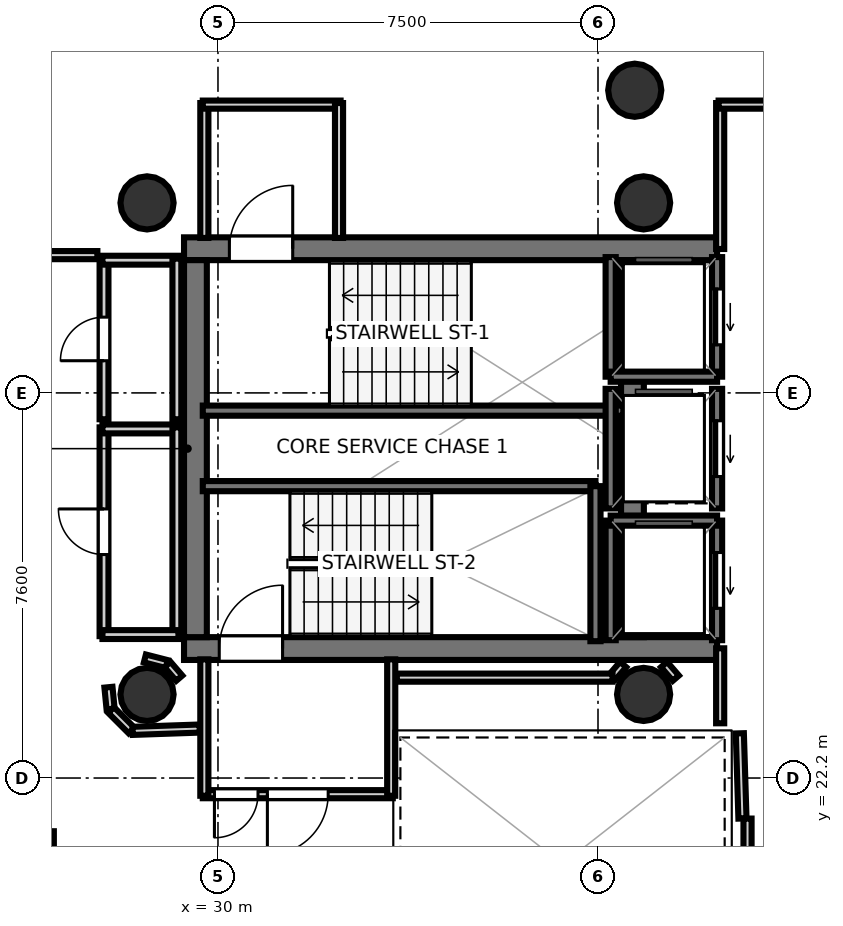
"""IFC4 building model, lengths in metres.
Left out: names, types, materials, properties, quantities, classifications, styles, units other than length and angle.
Written with IfcOpenShell. Run it as: python <this file> out.ifc"""

import sys

from ifc_helpers import new_model, si_unit, direction, frame, frame_2d, origin, origin_2d, place, context, subcontext, project, spatial, rectangle, hollow_circle, extrude, element, fill, save


model = new_model("IFC4")
c1 = context("Model", 3, precision=1e-05, world=origin(), true_north=direction((0.0, 1.0)))
c2 = subcontext(c1, "Body", "Model", "MODEL_VIEW")
j1 = project(units=[si_unit("LENGTHUNIT", "METRE"), si_unit("PLANEANGLEUNIT", "RADIAN")], contexts=[c1])
p1 = place(None, origin())
s1 = spatial("IfcSite", under=j1, at=p1, CompositionType="ELEMENT")
p2 = place(p1, origin())
s2 = spatial("IfcBuilding", under=s1, at=p2, CompositionType="ELEMENT")
p3 = place(p2, frame((0.0, 0.0, 242.7)))
s3 = spatial("IfcBuildingStorey", under=s2, at=p3, CompositionType="ELEMENT", Elevation=242.7)
p4 = place(p3, frame((29.33, 32.645, 0.0), z_axis=(0.0, 0.0, 1.0), x_axis=(1.0, 0.0, 0.0)))
e1 = element("IfcWall", 1, at=p4, inside=s3, PredefinedType="SHEAR", context=c2, shape_type="SweptSolid", body=[
    extrude(rectangle(XDim=10.52, YDim=0.45, at=frame_2d((5.26, 0.0))), origin(), (0.0, 0.0, 1.0), 3.52),
])
p5 = place(p4, frame((0.895, 0.0, 0.0)))
e2 = element("IfcOpeningElement", 2, at=p5, cuts=e1, PredefinedType="OPENING", context=c2, shape_type="SweptSolid", body=[
    extrude(rectangle(XDim=1.25, YDim=2.15, at=frame_2d((0.625, 1.075))), frame((0.0, 0.235, 0.0), z_axis=(0.0, -1.0, 0.0), x_axis=(1.0, 0.0, 0.0)), (0.0, 0.0, 1.0), 0.47),
])
p6 = place(p3, frame((29.33, 24.755, 0.0), z_axis=(0.0, 0.0, 1.0), x_axis=(1.0, 0.0, 0.0)))
e3 = element("IfcWall", 3, at=p6, inside=s3, PredefinedType="SHEAR", context=c2, shape_type="SweptSolid", body=[
    extrude(rectangle(XDim=10.52, YDim=0.45, at=frame_2d((5.26, 0.0))), origin(), (0.0, 0.0, 1.0), 3.52),
])
p7 = place(p6, frame((0.695, 0.0, 0.0)))
e4 = element("IfcOpeningElement", 4, at=p7, cuts=e3, PredefinedType="OPENING", context=c2, shape_type="SweptSolid", body=[
    extrude(rectangle(XDim=1.25, YDim=2.15, at=frame_2d((0.625, 1.075))), frame((0.0, 0.235, 0.0), z_axis=(0.0, -1.0, 0.0), x_axis=(1.0, 0.0, 0.0)), (0.0, 0.0, 1.0), 0.47),
])
for number, where, z_axis, x_axis in (
    (5, (29.555, 24.98, 0.0), (0.0, 0.0, 1.0), (0.0, 1.0, 0.0)),
    (6, (38.18, 24.98, 0.0), (0.0, 0.0, 1.0), (0.0, 1.0, 0.0)),
):
    element("IfcWall", number, at=place(p3, frame(where, z_axis=z_axis, x_axis=x_axis)), inside=s3, PredefinedType="SHEAR", context=c2, shape_type="SweptSolid", body=[
        extrude(rectangle(XDim=7.44, YDim=0.45, at=frame_2d((3.72, 0.0))), origin(), (0.0, 0.0, 1.0), 3.52),
    ])
for number, where, z_axis, x_axis in (
    (7, (28.6, 33.55, 0.0), (0.0, 0.0, 1.0), (1.0, 0.0, 0.0)),
    (8, (28.6, 23.85, 0.0), (0.0, 0.0, 1.0), (1.0, 0.0, 0.0)),
    (9, (38.4, 33.55, 0.0), (0.0, 0.0, 1.0), (1.0, 0.0, 0.0)),
    (10, (38.4, 23.85, 0.0), (0.0, 0.0, 1.0), (1.0, 0.0, 0.0)),
    (11, (38.225, 35.773, 0.0), (0.0, 0.0, 1.0), (1.0, 0.0, 0.0)),
):
    element("IfcColumn", number, at=place(p3, frame(where, z_axis=z_axis, x_axis=x_axis)), inside=s3, PredefinedType="COLUMN", context=c2, shape_type="SweptSolid", body=[
        extrude(hollow_circle(Radius=0.525, WallThickness=0.028, at=origin_2d()), origin(), (0.0, 0.0, 1.0), 3.7),
    ])
p8 = place(p3, frame((29.7, 29.45, 0.0), z_axis=(0.0, 0.0, 1.0), x_axis=(1.0, 0.0, 0.0)))
e12 = element("IfcWall", 12, at=p8, inside=s3, PredefinedType="SOLIDWALL", context=c2, shape_type="SweptSolid", body=[
    extrude(rectangle(XDim=8.3, YDim=0.2, at=frame_2d((4.15, 0.0))), origin(), (0.0, 0.0, 1.0), 3.52),
])
p9 = place(p3, frame((29.7, 27.96, 0.0), z_axis=(0.0, 0.0, 1.0), x_axis=(1.0, 0.0, 0.0)))
e13 = element("IfcWall", 13, at=p9, inside=s3, PredefinedType="SOLIDWALL", context=c2, shape_type="SweptSolid", body=[
    extrude(rectangle(XDim=7.75, YDim=0.2, at=frame_2d((3.875, 0.0))), origin(), (0.0, 0.0, 1.0), 3.52),
])
p10 = place(p3, frame((37.45, 24.9, 0.0), z_axis=(0.0, 0.0, 1.0), x_axis=(0.0, 1.0, 0.0)))
e14 = element("IfcWall", 14, at=p10, inside=s3, PredefinedType="SOLIDWALL", context=c2, shape_type="SweptSolid", body=[
    extrude(rectangle(XDim=3.06, YDim=0.2, at=frame_2d((1.53, 0.0))), origin(), (0.0, 0.0, 1.0), 3.52),
])
p11 = place(p3, frame((39.85, 30.12, 0.0), z_axis=(0.0, 0.0, 1.0), x_axis=(0.0, 1.0, 0.0)))
e15 = element("IfcWall", 15, at=p11, inside=s3, PredefinedType="SOLIDWALL", context=c2, shape_type="SweptSolid", body=[
    extrude(rectangle(XDim=2.36, YDim=0.2, at=frame_2d((1.18, 0.0))), origin(), (0.0, 0.0, 1.0), 3.52),
])
p12 = place(p11, frame((0.63, 0.0, 0.0)))
e16 = element("IfcOpeningElement", 16, at=p12, cuts=e15, PredefinedType="OPENING", context=c2, shape_type="SweptSolid", body=[
    extrude(rectangle(XDim=1.1, YDim=2.15, at=frame_2d((0.55, 1.075))), frame((0.0, 0.11, 0.0), z_axis=(0.0, -1.0, 0.0), x_axis=(1.0, 0.0, 0.0)), (0.0, 0.0, 1.0), 0.22),
])
p13 = place(p3, frame((37.75, 30.12, 0.0), z_axis=(0.0, 0.0, 1.0), x_axis=(0.0, 1.0, 0.0)))
e17 = element("IfcWall", 17, at=p13, inside=s3, PredefinedType="SOLIDWALL", context=c2, shape_type="SweptSolid", body=[
    extrude(rectangle(XDim=2.36, YDim=0.2, at=frame_2d((1.18, 0.0))), origin(), (0.0, 0.0, 1.0), 3.52),
])
p14 = place(p3, frame((37.75, 30.12, 0.0), z_axis=(0.0, 0.0, 1.0), x_axis=(1.0, 0.0, 0.0)))
e18 = element("IfcWall", 18, at=p14, inside=s3, PredefinedType="SOLIDWALL", context=c2, shape_type="SweptSolid", body=[
    extrude(rectangle(XDim=2.1, YDim=0.2, at=frame_2d((1.05, 0.0))), origin(), (0.0, 0.0, 1.0), 3.52),
])
p15 = place(p3, frame((39.85, 24.92, 0.0), z_axis=(0.0, 0.0, 1.0), x_axis=(0.0, 1.0, 0.0)))
e19 = element("IfcWall", 19, at=p15, inside=s3, PredefinedType="SOLIDWALL", context=c2, shape_type="SweptSolid", body=[
    extrude(rectangle(XDim=2.36, YDim=0.2, at=frame_2d((1.18, 0.0))), origin(), (0.0, 0.0, 1.0), 3.52),
])
p16 = place(p15, frame((0.63, 0.0, 0.0)))
e20 = element("IfcOpeningElement", 20, at=p16, cuts=e19, PredefinedType="OPENING", context=c2, shape_type="SweptSolid", body=[
    extrude(rectangle(XDim=1.1, YDim=2.15, at=frame_2d((0.55, 1.075))), frame((0.0, 0.11, 0.0), z_axis=(0.0, -1.0, 0.0), x_axis=(1.0, 0.0, 0.0)), (0.0, 0.0, 1.0), 0.22),
])
p17 = place(p3, frame((37.75, 24.92, 0.0), z_axis=(0.0, 0.0, 1.0), x_axis=(0.0, 1.0, 0.0)))
e21 = element("IfcWall", 21, at=p17, inside=s3, PredefinedType="SOLIDWALL", context=c2, shape_type="SweptSolid", body=[
    extrude(rectangle(XDim=2.36, YDim=0.2, at=frame_2d((1.18, 0.0))), origin(), (0.0, 0.0, 1.0), 3.52),
])
p18 = place(p3, frame((37.75, 27.28, 0.0), z_axis=(0.0, 0.0, 1.0), x_axis=(1.0, 0.0, 0.0)))
e22 = element("IfcWall", 22, at=p18, inside=s3, PredefinedType="SOLIDWALL", context=c2, shape_type="SweptSolid", body=[
    extrude(rectangle(XDim=2.1, YDim=0.2, at=frame_2d((1.05, 0.0))), origin(), (0.0, 0.0, 1.0), 3.52),
])
p19 = place(p3, frame((39.85, 27.52, 0.0), z_axis=(0.0, 0.0, 1.0), x_axis=(0.0, 1.0, 0.0)))
e23 = element("IfcWall", 23, at=p19, inside=s3, PredefinedType="SOLIDWALL", context=c2, shape_type="SweptSolid", body=[
    extrude(rectangle(XDim=2.36, YDim=0.2, at=frame_2d((1.18, 0.0))), origin(), (0.0, 0.0, 1.0), 3.52),
])
p20 = place(p19, frame((0.63, 0.0, 0.0)))
e24 = element("IfcOpeningElement", 24, at=p20, cuts=e23, PredefinedType="OPENING", context=c2, shape_type="SweptSolid", body=[
    extrude(rectangle(XDim=1.1, YDim=2.15, at=frame_2d((0.55, 1.075))), frame((0.0, 0.11, 0.0), z_axis=(0.0, -1.0, 0.0), x_axis=(1.0, 0.0, 0.0)), (0.0, 0.0, 1.0), 0.22),
])
p21 = place(p3, frame((37.75, 27.52, 0.0), z_axis=(0.0, 0.0, 1.0), x_axis=(0.0, 1.0, 0.0)))
e25 = element("IfcWall", 25, at=p21, inside=s3, PredefinedType="SOLIDWALL", context=c2, shape_type="SweptSolid", body=[
    extrude(rectangle(XDim=2.36, YDim=0.2, at=frame_2d((1.18, 0.0))), origin(), (0.0, 0.0, 1.0), 3.52),
])
p22 = place(p3, frame((29.731, 32.858, 0.0), z_axis=(0.0, 0.0, 1.0), x_axis=(0.0, 1.0, 0.0)))
e26 = element("IfcWall", 26, at=p22, inside=s3, PredefinedType="PARTITIONING", context=c2, shape_type="SweptSolid", body=[
    extrude(rectangle(XDim=2.662, YDim=0.16, at=frame_2d((1.331, 0.0))), origin(), (0.0, 0.0, 1.0), 2.84),
])
p23 = place(p3, frame((29.7, 35.489, 0.0), z_axis=(0.0, 0.0, 1.0), x_axis=(1.0, 0.0, 0.0)))
e27 = element("IfcWall", 27, at=p23, inside=s3, PredefinedType="PARTITIONING", context=c2, shape_type="SweptSolid", body=[
    extrude(rectangle(XDim=2.72, YDim=0.16, at=frame_2d((1.36, 0.0))), origin(), (0.0, 0.0, 1.0), 2.84),
])
p24 = place(p3, frame((32.389, 35.52, 0.0), z_axis=(0.0, 0.0, 1.0), x_axis=(0.0, -1.0, 0.0)))
e28 = element("IfcWall", 28, at=p24, inside=s3, PredefinedType="PARTITIONING", context=c2, shape_type="SweptSolid", body=[
    extrude(rectangle(XDim=2.662, YDim=0.16, at=frame_2d((1.331, 0.0))), origin(), (0.0, 0.0, 1.0), 2.84),
])
p25 = place(p3, frame((33.45, 21.881, 0.0), z_axis=(0.0, 0.0, 1.0), x_axis=(-1.0, 0.0, 0.0)))
e29 = element("IfcWall", 29, at=p25, inside=s3, PredefinedType="PARTITIONING", context=c2, shape_type="SweptSolid", body=[
    extrude(rectangle(XDim=3.75, YDim=0.16, at=frame_2d((1.875, 0.0))), origin(), (0.0, 0.0, 1.0), 2.84),
])
p26 = place(p25, frame((1.275, 0.0, 0.0)))
e30 = element("IfcOpeningElement", 30, at=p26, cuts=e29, PredefinedType="OPENING", context=c2, shape_type="SweptSolid", body=[
    extrude(rectangle(XDim=1.2, YDim=2.15, at=frame_2d((0.6, 1.075))), frame((0.0, 0.09, 0.0), z_axis=(0.0, -1.0, 0.0), x_axis=(1.0, 0.0, 0.0)), (0.0, 0.0, 1.0), 0.18),
])
p27 = place(p25, frame((2.66, 0.0, 0.0)))
e31 = element("IfcOpeningElement", 31, at=p27, cuts=e29, PredefinedType="OPENING", context=c2, shape_type="SweptSolid", body=[
    extrude(rectangle(XDim=0.86, YDim=2.05, at=frame_2d((0.43, 1.025))), frame((0.0, 0.09, 0.0), z_axis=(0.0, -1.0, 0.0), x_axis=(1.0, 0.0, 0.0)), (0.0, 0.0, 1.0), 0.18),
])
for number, where, z_axis, x_axis in (
    (32, (29.731, 21.85, 0.0), (0.0, 0.0, 1.0), (0.0, 1.0, 0.0)),
    (33, (33.419, 24.542, 0.0), (0.0, 0.0, 1.0), (0.0, -1.0, 0.0)),
):
    element("IfcWall", number, at=place(p3, frame(where, z_axis=z_axis, x_axis=x_axis)), inside=s3, PredefinedType="PARTITIONING", context=c2, shape_type="SweptSolid", body=[
        extrude(rectangle(XDim=2.692, YDim=0.16, at=frame_2d((1.346, 0.0))), origin(), (0.0, 0.0, 1.0), 2.84),
    ])
p28 = place(p3, frame((40.351, 21.401, 0.0), z_axis=(0.0, 0.0, 1.0), x_axis=(-0.031058045979, 0.999517582527, 0.0)))
e34 = element("IfcWall", 34, at=p28, inside=s3, PredefinedType="PARTITIONING", context=c2, shape_type="SweptSolid", body=[
    extrude(rectangle(XDim=1.682, YDim=0.16, at=frame_2d((0.841, 0.0))), origin(), (0.0, 0.0, 1.0), 2.84),
])
p29 = place(p3, frame((39.911, 23.28, 0.0), z_axis=(0.0, 0.0, 1.0), x_axis=(0.0, 1.0, 0.0)))
e35 = element("IfcWall", 35, at=p29, inside=s3, PredefinedType="PARTITIONING", context=c2, shape_type="SweptSolid", body=[
    extrude(rectangle(XDim=1.48, YDim=0.16, at=frame_2d((0.74, 0.0))), origin(), (0.0, 0.0, 1.0), 2.84),
])
p30 = place(p3, frame((39.911, 32.64, 0.0), z_axis=(0.0, 0.0, 1.0), x_axis=(0.0, 1.0, 0.0)))
e36 = element("IfcWall", 36, at=p30, inside=s3, PredefinedType="PARTITIONING", context=c2, shape_type="SweptSolid", body=[
    extrude(rectangle(XDim=2.88, YDim=0.16, at=frame_2d((1.44, 0.0))), origin(), (0.0, 0.0, 1.0), 2.84),
])
p31 = place(p3, frame((39.88, 35.489, 0.0), z_axis=(0.0, 0.0, 1.0), x_axis=(1.0, 0.0, 0.0)))
e37 = element("IfcWall", 37, at=p31, inside=s3, PredefinedType="PARTITIONING", context=c2, shape_type="SweptSolid", body=[
    extrude(rectangle(XDim=1.48, YDim=0.16, at=frame_2d((0.74, 0.0))), origin(), (0.0, 0.0, 1.0), 2.84),
])
p32 = place(p3, frame((40.451, 18.08, 0.0), z_axis=(0.0, 0.0, 1.0), x_axis=(0.0, 1.0, 0.0)))
e38 = element("IfcWall", 38, at=p32, inside=s3, PredefinedType="PARTITIONING", context=c2, shape_type="SweptSolid", body=[
    extrude(rectangle(XDim=3.32, YDim=0.16, at=frame_2d((1.66, 0.0))), origin(), (0.0, 0.0, 1.0), 2.84),
])
p33 = place(p3, frame((27.751, 25.0, 0.0), z_axis=(0.0, 0.0, 1.0), x_axis=(0.0, 1.0, 0.0)))
e39 = element("IfcWall", 39, at=p33, inside=s3, PredefinedType="PLUMBINGWALL", context=c2, shape_type="SweptSolid", body=[
    extrude(rectangle(XDim=4.12, YDim=0.175, at=frame_2d((2.06, 0.0))), origin(), (0.0, 0.0, 1.0), 2.84),
])
p34 = place(p33, frame((1.61, 0.0, 0.0)))
e40 = element("IfcOpeningElement", 40, at=p34, cuts=e39, PredefinedType="OPENING", context=c2, shape_type="SweptSolid", body=[
    extrude(rectangle(XDim=0.9, YDim=2.1, at=frame_2d((0.45, 1.05))), frame((0.0, 0.097, 0.0), z_axis=(0.0, -1.0, 0.0), x_axis=(1.0, 0.0, 0.0)), (0.0, 0.0, 1.0), 0.195),
])
p35 = place(p3, frame((27.72, 29.089, 0.0), z_axis=(0.0, 0.0, 1.0), x_axis=(1.0, 0.0, 0.0)))
e41 = element("IfcWall", 41, at=p35, inside=s3, PredefinedType="PLUMBINGWALL", context=c2, shape_type="SweptSolid", body=[
    extrude(rectangle(XDim=1.5, YDim=0.175, at=frame_2d((0.75, 0.0))), origin(), (0.0, 0.0, 1.0), 2.84),
])
p36 = place(p3, frame((29.189, 29.12, 0.0), z_axis=(0.0, 0.0, 1.0), x_axis=(0.0, -1.0, 0.0)))
e42 = element("IfcWall", 42, at=p36, inside=s3, PredefinedType="PLUMBINGWALL", context=c2, shape_type="SweptSolid", body=[
    extrude(rectangle(XDim=4.12, YDim=0.175, at=frame_2d((2.06, 0.0))), origin(), (0.0, 0.0, 1.0), 2.84),
])
p37 = place(p3, frame((29.22, 25.031, 0.0), z_axis=(0.0, 0.0, 1.0), x_axis=(-1.0, 0.0, 0.0)))
e43 = element("IfcWall", 43, at=p37, inside=s3, PredefinedType="PLUMBINGWALL", context=c2, shape_type="SweptSolid", body=[
    extrude(rectangle(XDim=1.5, YDim=0.175, at=frame_2d((0.75, 0.0))), origin(), (0.0, 0.0, 1.0), 2.84),
])
p38 = place(p3, frame((27.751, 29.28, 0.0), z_axis=(0.0, 0.0, 1.0), x_axis=(0.0, 1.0, 0.0)))
e44 = element("IfcWall", 44, at=p38, inside=s3, PredefinedType="PLUMBINGWALL", context=c2, shape_type="SweptSolid", body=[
    extrude(rectangle(XDim=3.17, YDim=0.175, at=frame_2d((1.585, 0.0))), origin(), (0.0, 0.0, 1.0), 2.84),
])
p39 = place(p38, frame((1.155, 0.0, 0.0)))
e45 = element("IfcOpeningElement", 45, at=p39, cuts=e44, PredefinedType="OPENING", context=c2, shape_type="SweptSolid", body=[
    extrude(rectangle(XDim=0.86, YDim=2.05, at=frame_2d((0.43, 1.025))), frame((0.0, 0.097, 0.0), z_axis=(0.0, -1.0, 0.0), x_axis=(1.0, 0.0, 0.0)), (0.0, 0.0, 1.0), 0.195),
])
p40 = place(p3, frame((27.72, 32.419, 0.0), z_axis=(0.0, 0.0, 1.0), x_axis=(1.0, 0.0, 0.0)))
e46 = element("IfcWall", 46, at=p40, inside=s3, PredefinedType="PLUMBINGWALL", context=c2, shape_type="SweptSolid", body=[
    extrude(rectangle(XDim=1.5, YDim=0.175, at=frame_2d((0.75, 0.0))), origin(), (0.0, 0.0, 1.0), 2.84),
])
p41 = place(p3, frame((29.189, 32.45, 0.0), z_axis=(0.0, 0.0, 1.0), x_axis=(0.0, -1.0, 0.0)))
e47 = element("IfcWall", 47, at=p41, inside=s3, PredefinedType="PLUMBINGWALL", context=c2, shape_type="SweptSolid", body=[
    extrude(rectangle(XDim=3.17, YDim=0.175, at=frame_2d((1.585, 0.0))), origin(), (0.0, 0.0, 1.0), 2.84),
])
p42 = place(p3, frame((29.236, 24.17, 0.0), z_axis=(0.0, 0.0, 1.0), x_axis=(-0.652260263346, 0.757995084984, 0.0)))
e48 = element("IfcWall", 48, at=p42, inside=s3, PredefinedType="PARTITIONING", context=c2, shape_type="SweptSolid", body=[
    extrude(rectangle(XDim=0.355, YDim=0.16, at=frame_2d((0.178, 0.0))), origin(), (0.0, 0.0, 1.0), 2.84),
])
p43 = place(p3, frame((28.988, 24.45, 0.0), z_axis=(0.0, 0.0, 1.0), x_axis=(-0.968704505916, 0.248216800836, 0.0)))
e49 = element("IfcWall", 49, at=p43, inside=s3, PredefinedType="PARTITIONING", context=c2, shape_type="SweptSolid", body=[
    extrude(rectangle(XDim=0.445, YDim=0.16, at=frame_2d((0.222, 0.0))), origin(), (0.0, 0.0, 1.0), 2.84),
])
p44 = place(p3, frame((39.036, 24.17, 0.0), z_axis=(0.0, 0.0, 1.0), x_axis=(-0.652260263346, 0.757995084984, 0.0)))
e50 = element("IfcWall", 50, at=p44, inside=s3, PredefinedType="PARTITIONING", context=c2, shape_type="SweptSolid", body=[
    extrude(rectangle(XDim=0.355, YDim=0.16, at=frame_2d((0.178, 0.0))), origin(), (0.0, 0.0, 1.0), 2.84),
])
p45 = place(p3, frame((37.996, 24.44, 0.0), z_axis=(0.0, 0.0, 1.0), x_axis=(-0.652425645794, -0.757852740782, 0.0)))
e51 = element("IfcWall", 51, at=p45, inside=s3, PredefinedType="PARTITIONING", context=c2, shape_type="SweptSolid", body=[
    extrude(rectangle(XDim=0.32, YDim=0.16, at=frame_2d((0.16, 0.0))), origin(), (0.0, 0.0, 1.0), 2.84),
])
p46 = place(p3, frame((37.787, 24.181, 0.0), z_axis=(0.0, 0.0, 1.0), x_axis=(-1.0, 0.0, 0.0)))
e52 = element("IfcWall", 52, at=p46, inside=s3, PredefinedType="PARTITIONING", context=c2, shape_type="SweptSolid", body=[
    extrude(rectangle(XDim=4.257, YDim=0.16, at=frame_2d((2.129, 0.0))), origin(), (0.0, 0.0, 1.0), 2.84),
])
p47 = place(p3, frame((27.838, 23.992, 0.0), z_axis=(0.0, 0.0, 1.0), x_axis=(0.098273407977, -0.995159453196, 0.0)))
e53 = element("IfcWall", 53, at=p47, inside=s3, PredefinedType="PARTITIONING", context=c2, shape_type="SweptSolid", body=[
    extrude(rectangle(XDim=0.432, YDim=0.16, at=frame_2d((0.216, 0.0))), origin(), (0.0, 0.0, 1.0), 2.84),
])
p48 = place(p3, frame((27.89, 23.543, 0.0), z_axis=(0.0, 0.0, 1.0), x_axis=(0.707106781187, -0.707106781187, 0.0)))
e54 = element("IfcWall", 54, at=p48, inside=s3, PredefinedType="PARTITIONING", context=c2, shape_type="SweptSolid", body=[
    extrude(rectangle(XDim=0.57, YDim=0.16, at=frame_2d((0.285, 0.0))), origin(), (0.0, 0.0, 1.0), 2.84),
])
p49 = place(p3, frame((28.316, 23.131, 0.0), z_axis=(0.0, 0.0, 1.0), x_axis=(0.999405342193, 0.034481328227, 0.0)))
e55 = element("IfcWall", 55, at=p49, inside=s3, PredefinedType="PARTITIONING", context=c2, shape_type="SweptSolid", body=[
    extrude(rectangle(XDim=1.324, YDim=0.16, at=frame_2d((0.662, 0.0))), origin(), (0.0, 0.0, 1.0), 2.84),
])
p50 = place(p3, frame((26.681, 17.95, 0.0), z_axis=(0.0, 0.0, 1.0), x_axis=(0.0, 1.0, 0.0)))
e56 = element("IfcWall", 56, at=p50, inside=s3, PredefinedType="PARTITIONING", context=c2, shape_type="SweptSolid", body=[
    extrude(rectangle(XDim=3.2, YDim=0.16, at=frame_2d((1.6, 0.0))), origin(), (0.0, 0.0, 1.0), 2.84),
])
p51 = place(p3, frame((25.25, 32.519, 0.0), z_axis=(0.0, 0.0, 1.0), x_axis=(1.0, 0.0, 0.0)))
e57 = element("IfcWall", 57, at=p51, inside=s3, PredefinedType="PARTITIONING", context=c2, shape_type="SweptSolid", body=[
    extrude(rectangle(XDim=2.37, YDim=0.16, at=frame_2d((1.185, 0.0))), origin(), (0.0, 0.0, 1.0), 2.84),
])
p52 = place(p3, frame((22.507, 37.459, 0.0), z_axis=(0.0, 0.0, 1.0), x_axis=(0.999098166192, -0.042460031931, 0.0)))
e58 = element("IfcWall", 58, at=p52, inside=s3, PredefinedType="PARTITIONING", context=c2, shape_type="SweptSolid", body=[
    extrude(rectangle(XDim=34.609, YDim=0.14, at=frame_2d((17.304, 0.0))), origin(), (0.0, 0.0, 1.0), 2.84),
])
p53 = place(p5, origin())
e59 = element("IfcDoor", 59, at=p53, inside=s3, OperationType="SINGLE_SWING_RIGHT", PredefinedType="DOOR", context=c2, shape_type="SweptSolid", body=[
    extrude(rectangle(XDim=1.25, YDim=2.15, at=frame_2d((0.625, 1.075))), frame((0.0, 0.025, 0.0), z_axis=(0.0, -1.0, 0.0), x_axis=(1.0, 0.0, 0.0)), (0.0, 0.0, 1.0), 0.05),
])
fill(e2, e59)
p54 = place(p7, origin())
e60 = element("IfcDoor", 60, at=p54, inside=s3, OperationType="SINGLE_SWING_RIGHT", PredefinedType="DOOR", context=c2, shape_type="SweptSolid", body=[
    extrude(rectangle(XDim=1.25, YDim=2.15, at=frame_2d((0.625, 1.075))), frame((0.0, 0.025, 0.0), z_axis=(0.0, -1.0, 0.0), x_axis=(1.0, 0.0, 0.0)), (0.0, 0.0, 1.0), 0.05),
])
fill(e4, e60)
p55 = place(p12, origin())
e61 = element("IfcDoor", 61, at=p55, inside=s3, OperationType="SLIDING_TO_LEFT", PredefinedType="DOOR", context=c2, shape_type="SweptSolid", body=[
    extrude(rectangle(XDim=1.1, YDim=2.15, at=frame_2d((0.55, 1.075))), frame((0.0, 0.025, 0.0), z_axis=(0.0, -1.0, 0.0), x_axis=(1.0, 0.0, 0.0)), (0.0, 0.0, 1.0), 0.05),
])
fill(e16, e61)
p56 = place(p16, origin())
e62 = element("IfcDoor", 62, at=p56, inside=s3, OperationType="SLIDING_TO_LEFT", PredefinedType="DOOR", context=c2, shape_type="SweptSolid", body=[
    extrude(rectangle(XDim=1.1, YDim=2.15, at=frame_2d((0.55, 1.075))), frame((0.0, 0.025, 0.0), z_axis=(0.0, -1.0, 0.0), x_axis=(1.0, 0.0, 0.0)), (0.0, 0.0, 1.0), 0.05),
])
fill(e20, e62)
p57 = place(p20, origin())
e63 = element("IfcDoor", 63, at=p57, inside=s3, OperationType="SLIDING_TO_LEFT", PredefinedType="DOOR", context=c2, shape_type="SweptSolid", body=[
    extrude(rectangle(XDim=1.1, YDim=2.15, at=frame_2d((0.55, 1.075))), frame((0.0, 0.025, 0.0), z_axis=(0.0, -1.0, 0.0), x_axis=(1.0, 0.0, 0.0)), (0.0, 0.0, 1.0), 0.05),
])
fill(e24, e63)
p58 = place(p26, origin())
e64 = element("IfcDoor", 64, at=p58, inside=s3, OperationType="SINGLE_SWING_RIGHT", PredefinedType="DOOR", context=c2, shape_type="SweptSolid", body=[
    extrude(rectangle(XDim=1.2, YDim=2.15, at=frame_2d((0.6, 1.075))), frame((0.0, 0.025, 0.0), z_axis=(0.0, -1.0, 0.0), x_axis=(1.0, 0.0, 0.0)), (0.0, 0.0, 1.0), 0.05),
])
fill(e30, e64)
p59 = place(p34, origin())
e65 = element("IfcDoor", 65, at=p59, inside=s3, OperationType="SINGLE_SWING_RIGHT", PredefinedType="DOOR", context=c2, shape_type="SweptSolid", body=[
    extrude(rectangle(XDim=0.9, YDim=2.1, at=frame_2d((0.45, 1.05))), frame((0.0, 0.025, 0.0), z_axis=(0.0, -1.0, 0.0), x_axis=(1.0, 0.0, 0.0)), (0.0, 0.0, 1.0), 0.05),
])
fill(e40, e65)
p60 = place(p39, origin())
e66 = element("IfcDoor", 66, at=p60, inside=s3, OperationType="SINGLE_SWING_LEFT", PredefinedType="DOOR", context=c2, shape_type="SweptSolid", body=[
    extrude(rectangle(XDim=0.86, YDim=2.05, at=frame_2d((0.43, 1.025))), frame((0.0, 0.025, 0.0), z_axis=(0.0, -1.0, 0.0), x_axis=(1.0, 0.0, 0.0)), (0.0, 0.0, 1.0), 0.05),
])
fill(e45, e66)
p61 = place(p27, origin())
e67 = element("IfcDoor", 67, at=p61, inside=s3, OperationType="SINGLE_SWING_RIGHT", PredefinedType="DOOR", context=c2, shape_type="SweptSolid", body=[
    extrude(rectangle(XDim=0.86, YDim=2.05, at=frame_2d((0.43, 1.025))), frame((0.0, 0.025, 0.0), z_axis=(0.0, -1.0, 0.0), x_axis=(1.0, 0.0, 0.0)), (0.0, 0.0, 1.0), 0.05),
])
fill(e31, e67)
save(model, sys.argv[1])
